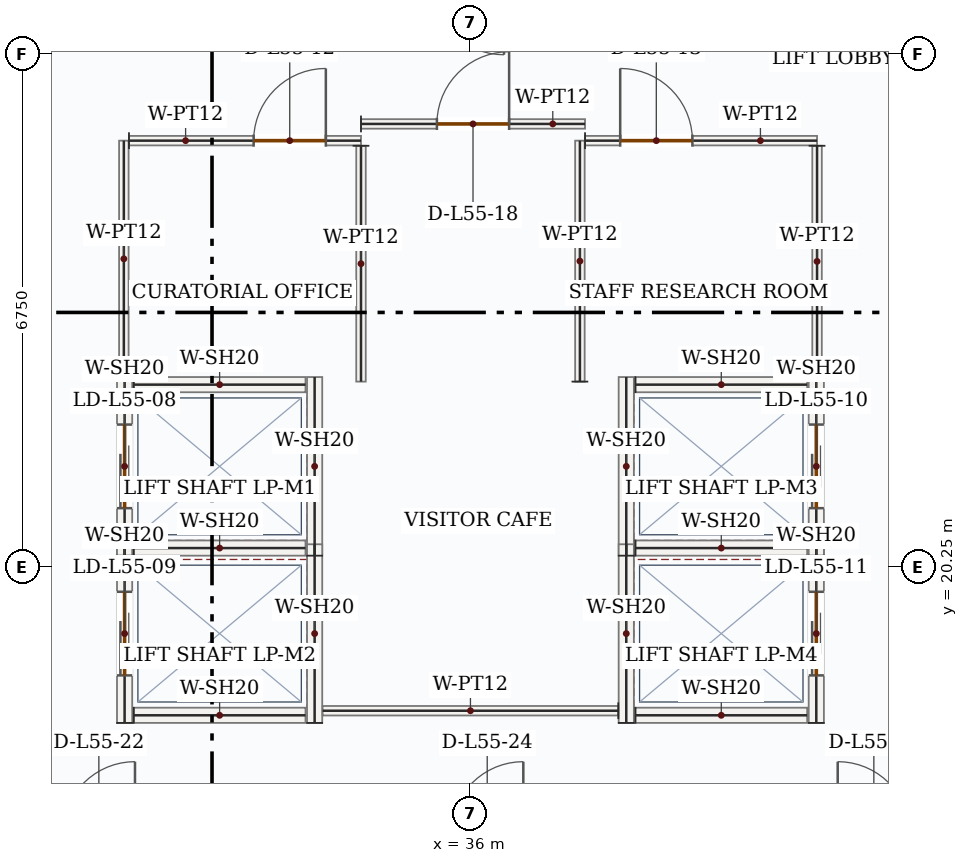
"""IFC4 building model, lengths in metres.
Left out: names, types, materials, properties, quantities, classifications, styles, units other than length and angle.
Written with IfcOpenShell. Run it as: python <this file> out.ifc"""

import sys

from ifc_helpers import new_model, si_unit, direction, frame, frame_2d, origin, place, context, subcontext, project, spatial, rectangle, extrude, source, transform, mapped, element, fill, save


model = new_model("IFC4")
c1 = context("Model", 3, precision=1e-05, world=origin(), true_north=direction((0.0, 1.0)))
c2 = subcontext(c1, "Body", "Model", "MODEL_VIEW")
j1 = project(units=[si_unit("LENGTHUNIT", "METRE"), si_unit("PLANEANGLEUNIT", "RADIAN")], contexts=[c1])
p1 = place(None, origin())
s1 = spatial("IfcSite", under=j1, at=p1, CompositionType="ELEMENT")
p2 = place(p1, origin())
s2 = spatial("IfcBuilding", under=s1, at=p2, CompositionType="ELEMENT")
p3 = place(p2, frame((0.0, 0.0, 234.3)))
s3 = spatial("IfcBuildingStorey", under=s2, at=p3, CompositionType="ELEMENT", Elevation=234.3)
p4 = place(p3, frame((31.45, 20.4, 0.0), z_axis=(0.0, 0.0, 1.0), x_axis=(0.0, 1.0, 0.0)))
e1 = element("IfcWall", 1, at=p4, inside=s3, PredefinedType="SOLIDWALL", context=c2, shape_type="SweptSolid", body=[
    extrude(rectangle(XDim=2.35, YDim=0.2, at=frame_2d((1.175, 0.0))), origin(), (0.0, 0.0, 1.0), 4.55),
])
p5 = place(p4, frame((0.625, 0.0, 0.0)))
e2 = element("IfcOpeningElement", 2, at=p5, cuts=e1, PredefinedType="OPENING", context=c2, shape_type="SweptSolid", body=[
    extrude(rectangle(XDim=1.1, YDim=2.15, at=frame_2d((0.55, 1.075))), frame((0.0, 0.11, 0.0), z_axis=(0.0, -1.0, 0.0), x_axis=(1.0, 0.0, 0.0)), (0.0, 0.0, 1.0), 0.22),
])
m1 = source(origin(), c2, "Body", "SweptSolid", [
    extrude(rectangle(XDim=2.35, YDim=0.2, at=frame_2d((1.175, 0.0))), origin(), (0.0, 0.0, 1.0), 4.55),
])
p6 = place(p3, frame((33.95, 20.4, 0.0), z_axis=(0.0, 0.0, 1.0), x_axis=(0.0, 1.0, 0.0)))
e3 = element("IfcWall", 3, at=p6, inside=s3, PredefinedType="SOLIDWALL", context=c2, shape_type="MappedRepresentation", body=[
    mapped(m1, transform((0.0, 0.0, 0.0), x_axis=(1.0, 0.0, 0.0), y_axis=(0.0, 1.0, 0.0), z_axis=(0.0, 0.0, 1.0), scale=1.0)),
])
m2 = source(origin(), c2, "Body", "SweptSolid", [
    extrude(rectangle(XDim=2.26, YDim=0.2, at=frame_2d((1.13, 0.0))), origin(), (0.0, 0.0, 1.0), 4.55),
])
for number, where, z_axis, x_axis in (
    (4, (31.57, 20.5, 0.0), (0.0, 0.0, 1.0), (1.0, 0.0, 0.0)),
    (5, (31.57, 22.65, 0.0), (0.0, 0.0, 1.0), (1.0, 0.0, 0.0)),
):
    element("IfcWall", number, at=place(p3, frame(where, z_axis=z_axis, x_axis=x_axis)), inside=s3, PredefinedType="SOLIDWALL", context=c2, shape_type="MappedRepresentation", body=[
        mapped(m2, transform((0.0, 0.0, 0.0), x_axis=(1.0, 0.0, 0.0), y_axis=(0.0, 1.0, 0.0), z_axis=(0.0, 0.0, 1.0), scale=1.0)),
    ])
p7 = place(p3, frame((31.45, 18.2, 0.0), z_axis=(0.0, 0.0, 1.0), x_axis=(0.0, 1.0, 0.0)))
e6 = element("IfcWall", 6, at=p7, inside=s3, PredefinedType="SOLIDWALL", context=c2, shape_type="SweptSolid", body=[
    extrude(rectangle(XDim=2.35, YDim=0.2, at=frame_2d((1.175, 0.0))), origin(), (0.0, 0.0, 1.0), 4.55),
])
p8 = place(p7, frame((0.625, 0.0, 0.0)))
e7 = element("IfcOpeningElement", 7, at=p8, cuts=e6, PredefinedType="OPENING", context=c2, shape_type="SweptSolid", body=[
    extrude(rectangle(XDim=1.1, YDim=2.15, at=frame_2d((0.55, 1.075))), frame((0.0, 0.11, 0.0), z_axis=(0.0, -1.0, 0.0), x_axis=(1.0, 0.0, 0.0)), (0.0, 0.0, 1.0), 0.22),
])
p9 = place(p3, frame((33.95, 18.2, 0.0), z_axis=(0.0, 0.0, 1.0), x_axis=(0.0, 1.0, 0.0)))
e8 = element("IfcWall", 8, at=p9, inside=s3, PredefinedType="SOLIDWALL", context=c2, shape_type="MappedRepresentation", body=[
    mapped(m1, transform((0.0, 0.0, 0.0), x_axis=(1.0, 0.0, 0.0), y_axis=(0.0, 1.0, 0.0), z_axis=(0.0, 0.0, 1.0), scale=1.0)),
])
p10 = place(p3, frame((31.57, 18.3, 0.0), z_axis=(0.0, 0.0, 1.0), x_axis=(1.0, 0.0, 0.0)))
e9 = element("IfcWall", 9, at=p10, inside=s3, PredefinedType="SOLIDWALL", context=c2, shape_type="MappedRepresentation", body=[
    mapped(m2, transform((0.0, 0.0, 0.0), x_axis=(1.0, 0.0, 0.0), y_axis=(0.0, 1.0, 0.0), z_axis=(0.0, 0.0, 1.0), scale=1.0)),
])
p11 = place(p3, frame((38.05, 20.4, 0.0), z_axis=(0.0, 0.0, 1.0), x_axis=(0.0, 1.0, 0.0)))
e10 = element("IfcWall", 10, at=p11, inside=s3, PredefinedType="SOLIDWALL", context=c2, shape_type="MappedRepresentation", body=[
    mapped(m1, transform((0.0, 0.0, 0.0), x_axis=(1.0, 0.0, 0.0), y_axis=(0.0, 1.0, 0.0), z_axis=(0.0, 0.0, 1.0), scale=1.0)),
])
p12 = place(p3, frame((40.55, 20.4, 0.0), z_axis=(0.0, 0.0, 1.0), x_axis=(0.0, 1.0, 0.0)))
e11 = element("IfcWall", 11, at=p12, inside=s3, PredefinedType="SOLIDWALL", context=c2, shape_type="SweptSolid", body=[
    extrude(rectangle(XDim=2.35, YDim=0.2, at=frame_2d((1.175, 0.0))), origin(), (0.0, 0.0, 1.0), 4.55),
])
p13 = place(p12, frame((0.625, 0.0, 0.0)))
e12 = element("IfcOpeningElement", 12, at=p13, cuts=e11, PredefinedType="OPENING", context=c2, shape_type="SweptSolid", body=[
    extrude(rectangle(XDim=1.1, YDim=2.15, at=frame_2d((0.55, 1.075))), frame((0.0, 0.11, 0.0), z_axis=(0.0, -1.0, 0.0), x_axis=(1.0, 0.0, 0.0)), (0.0, 0.0, 1.0), 0.22),
])
for number, where, z_axis, x_axis in (
    (13, (38.17, 20.5, 0.0), (0.0, 0.0, 1.0), (1.0, 0.0, 0.0)),
    (14, (38.17, 22.65, 0.0), (0.0, 0.0, 1.0), (1.0, 0.0, 0.0)),
):
    element("IfcWall", number, at=place(p3, frame(where, z_axis=z_axis, x_axis=x_axis)), inside=s3, PredefinedType="SOLIDWALL", context=c2, shape_type="MappedRepresentation", body=[
        mapped(m2, transform((0.0, 0.0, 0.0), x_axis=(1.0, 0.0, 0.0), y_axis=(0.0, 1.0, 0.0), z_axis=(0.0, 0.0, 1.0), scale=1.0)),
    ])
p14 = place(p3, frame((38.05, 18.2, 0.0), z_axis=(0.0, 0.0, 1.0), x_axis=(0.0, 1.0, 0.0)))
e15 = element("IfcWall", 15, at=p14, inside=s3, PredefinedType="SOLIDWALL", context=c2, shape_type="MappedRepresentation", body=[
    mapped(m1, transform((0.0, 0.0, 0.0), x_axis=(1.0, 0.0, 0.0), y_axis=(0.0, 1.0, 0.0), z_axis=(0.0, 0.0, 1.0), scale=1.0)),
])
p15 = place(p3, frame((40.55, 18.2, 0.0), z_axis=(0.0, 0.0, 1.0), x_axis=(0.0, 1.0, 0.0)))
e16 = element("IfcWall", 16, at=p15, inside=s3, PredefinedType="SOLIDWALL", context=c2, shape_type="SweptSolid", body=[
    extrude(rectangle(XDim=2.35, YDim=0.2, at=frame_2d((1.175, 0.0))), origin(), (0.0, 0.0, 1.0), 4.55),
])
p16 = place(p15, frame((0.625, 0.0, 0.0)))
e17 = element("IfcOpeningElement", 17, at=p16, cuts=e16, PredefinedType="OPENING", context=c2, shape_type="SweptSolid", body=[
    extrude(rectangle(XDim=1.1, YDim=2.15, at=frame_2d((0.55, 1.075))), frame((0.0, 0.11, 0.0), z_axis=(0.0, -1.0, 0.0), x_axis=(1.0, 0.0, 0.0)), (0.0, 0.0, 1.0), 0.22),
])
p17 = place(p3, frame((38.17, 18.3, 0.0), z_axis=(0.0, 0.0, 1.0), x_axis=(1.0, 0.0, 0.0)))
e18 = element("IfcWall", 18, at=p17, inside=s3, PredefinedType="SOLIDWALL", context=c2, shape_type="MappedRepresentation", body=[
    mapped(m2, transform((0.0, 0.0, 0.0), x_axis=(1.0, 0.0, 0.0), y_axis=(0.0, 1.0, 0.0), z_axis=(0.0, 0.0, 1.0), scale=1.0)),
])
m3 = source(origin(), c2, "Body", "SweptSolid", [
    extrude(rectangle(XDim=3.11, YDim=0.125, at=frame_2d((1.555, 0.0))), origin(), (0.0, 0.0, 1.0), 4.55),
])
p18 = place(p3, frame((31.44, 22.75, 0.0), z_axis=(0.0, 0.0, 1.0), x_axis=(0.0, 1.0, 0.0)))
e19 = element("IfcWall", 19, at=p18, inside=s3, PredefinedType="PARTITIONING", context=c2, shape_type="MappedRepresentation", body=[
    mapped(m3, transform((0.0, 0.0, 0.0), x_axis=(1.0, 0.0, 0.0), y_axis=(0.0, 1.0, 0.0), z_axis=(0.0, 0.0, 1.0), scale=1.0)),
])
p19 = place(p3, frame((31.508, 25.86, 0.0), z_axis=(0.0, 0.0, 1.0), x_axis=(1.0, 0.0, 0.0)))
e20 = element("IfcWall", 20, at=p19, inside=s3, PredefinedType="PARTITIONING", context=c2, shape_type="SweptSolid", body=[
    extrude(rectangle(XDim=3.052, YDim=0.125, at=frame_2d((1.526, 0.0))), origin(), (0.0, 0.0, 1.0), 4.55),
])
p20 = place(p19, frame((1.64, 0.0, 0.0)))
e21 = element("IfcOpeningElement", 21, at=p20, cuts=e20, PredefinedType="OPENING", context=c2, shape_type="SweptSolid", body=[
    extrude(rectangle(XDim=0.95, YDim=2.15, at=frame_2d((0.475, 1.075))), frame((0.0, 0.073, 0.0), z_axis=(0.0, -1.0, 0.0), x_axis=(1.0, 0.0, 0.0)), (0.0, 0.0, 1.0), 0.145),
])
m4 = source(origin(), c2, "Body", "SweptSolid", [
    extrude(rectangle(XDim=3.103, YDim=0.125, at=frame_2d((1.551, 0.0))), origin(), (0.0, 0.0, 1.0), 4.55),
])
p21 = place(p3, frame((34.56, 25.792, 0.0), z_axis=(0.0, 0.0, 1.0), x_axis=(0.0, -1.0, 0.0)))
e22 = element("IfcWall", 22, at=p21, inside=s3, PredefinedType="PARTITIONING", context=c2, shape_type="MappedRepresentation", body=[
    mapped(m4, transform((0.0, 0.0, 0.0), x_axis=(1.0, 0.0, 0.0), y_axis=(0.0, 1.0, 0.0), z_axis=(0.0, 0.0, 1.0), scale=1.0)),
])
m5 = source(origin(), c2, "Body", "SweptSolid", [
    extrude(rectangle(XDim=3.17, YDim=0.125, at=frame_2d((1.585, 0.0))), origin(), (0.0, 0.0, 1.0), 4.55),
])
p22 = place(p3, frame((37.44, 22.69, 0.0), z_axis=(0.0, 0.0, 1.0), x_axis=(0.0, 1.0, 0.0)))
e23 = element("IfcWall", 23, at=p22, inside=s3, PredefinedType="PARTITIONING", context=c2, shape_type="MappedRepresentation", body=[
    mapped(m5, transform((0.0, 0.0, 0.0), x_axis=(1.0, 0.0, 0.0), y_axis=(0.0, 1.0, 0.0), z_axis=(0.0, 0.0, 1.0), scale=1.0)),
])
p23 = place(p3, frame((37.508, 25.86, 0.0), z_axis=(0.0, 0.0, 1.0), x_axis=(1.0, 0.0, 0.0)))
e24 = element("IfcWall", 24, at=p23, inside=s3, PredefinedType="PARTITIONING", context=c2, shape_type="SweptSolid", body=[
    extrude(rectangle(XDim=3.052, YDim=0.125, at=frame_2d((1.526, 0.0))), origin(), (0.0, 0.0, 1.0), 4.55),
])
p24 = place(p23, frame((0.463, 0.0, 0.0)))
e25 = element("IfcOpeningElement", 25, at=p24, cuts=e24, PredefinedType="OPENING", context=c2, shape_type="SweptSolid", body=[
    extrude(rectangle(XDim=0.95, YDim=2.15, at=frame_2d((0.475, 1.075))), frame((0.0, 0.073, 0.0), z_axis=(0.0, -1.0, 0.0), x_axis=(1.0, 0.0, 0.0)), (0.0, 0.0, 1.0), 0.145),
])
m6 = source(origin(), c2, "Body", "SweptSolid", [
    extrude(rectangle(XDim=3.042, YDim=0.125, at=frame_2d((1.521, 0.0))), origin(), (0.0, 0.0, 1.0), 4.55),
])
p25 = place(p3, frame((40.56, 25.792, 0.0), z_axis=(0.0, 0.0, 1.0), x_axis=(0.0, -1.0, 0.0)))
e26 = element("IfcWall", 26, at=p25, inside=s3, PredefinedType="PARTITIONING", context=c2, shape_type="MappedRepresentation", body=[
    mapped(m6, transform((0.0, 0.0, 0.0), x_axis=(1.0, 0.0, 0.0), y_axis=(0.0, 1.0, 0.0), z_axis=(0.0, 0.0, 1.0), scale=1.0)),
])
m7 = source(origin(), c2, "Body", "SweptSolid", [
    extrude(rectangle(XDim=3.89, YDim=0.125, at=frame_2d((1.945, 0.0))), origin(), (0.0, 0.0, 1.0), 4.55),
])
p26 = place(p3, frame((37.945, 18.36, 0.0), z_axis=(0.0, 0.0, 1.0), x_axis=(-1.0, 0.0, 0.0)))
e27 = element("IfcWall", 27, at=p26, inside=s3, PredefinedType="PARTITIONING", context=c2, shape_type="MappedRepresentation", body=[
    mapped(m7, transform((0.0, 0.0, 0.0), x_axis=(1.0, 0.0, 0.0), y_axis=(0.0, 1.0, 0.0), z_axis=(0.0, 0.0, 1.0), scale=1.0)),
])
p27 = place(p3, frame((34.56, 26.08, 0.0), z_axis=(0.0, 0.0, 1.0), x_axis=(1.0, 0.0, 0.0)))
e28 = element("IfcWall", 28, at=p27, inside=s3, PredefinedType="PARTITIONING", context=c2, shape_type="SweptSolid", body=[
    extrude(rectangle(XDim=2.948, YDim=0.125, at=frame_2d((1.474, 0.0))), origin(), (0.0, 0.0, 1.0), 4.55),
])
p28 = place(p27, frame((0.999, 0.0, 0.0)))
e29 = element("IfcOpeningElement", 29, at=p28, cuts=e28, PredefinedType="OPENING", context=c2, shape_type="SweptSolid", body=[
    extrude(rectangle(XDim=0.95, YDim=2.15, at=frame_2d((0.475, 1.075))), frame((0.0, 0.073, 0.0), z_axis=(0.0, -1.0, 0.0), x_axis=(1.0, 0.0, 0.0)), (0.0, 0.0, 1.0), 0.145),
])
m8 = source(origin(), c2, "Body", "SweptSolid", [
    extrude(rectangle(XDim=1.1, YDim=2.15, at=frame_2d((0.55, 1.075))), frame((0.0, 0.025, 0.0), z_axis=(0.0, -1.0, 0.0), x_axis=(1.0, 0.0, 0.0)), (0.0, 0.0, 1.0), 0.05),
])
p29 = place(p5, origin())
e30 = element("IfcDoor", 30, at=p29, inside=s3, OperationType="DOUBLE_DOOR_SLIDING", PredefinedType="DOOR", context=c2, shape_type="MappedRepresentation", body=[
    mapped(m8, transform((0.0, 0.0, 0.0), x_axis=(1.0, 0.0, 0.0), y_axis=(0.0, 1.0, 0.0), z_axis=(0.0, 0.0, 1.0), scale=1.0)),
])
fill(e2, e30)
p30 = place(p8, origin())
e31 = element("IfcDoor", 31, at=p30, inside=s3, OperationType="DOUBLE_DOOR_SLIDING", PredefinedType="DOOR", context=c2, shape_type="MappedRepresentation", body=[
    mapped(m8, transform((0.0, 0.0, 0.0), x_axis=(1.0, 0.0, 0.0), y_axis=(0.0, 1.0, 0.0), z_axis=(0.0, 0.0, 1.0), scale=1.0)),
])
fill(e7, e31)
p31 = place(p13, origin())
e32 = element("IfcDoor", 32, at=p31, inside=s3, OperationType="DOUBLE_DOOR_SLIDING", PredefinedType="DOOR", context=c2, shape_type="MappedRepresentation", body=[
    mapped(m8, transform((0.0, 0.0, 0.0), x_axis=(1.0, 0.0, 0.0), y_axis=(0.0, 1.0, 0.0), z_axis=(0.0, 0.0, 1.0), scale=1.0)),
])
fill(e12, e32)
p32 = place(p16, origin())
e33 = element("IfcDoor", 33, at=p32, inside=s3, OperationType="DOUBLE_DOOR_SLIDING", PredefinedType="DOOR", context=c2, shape_type="MappedRepresentation", body=[
    mapped(m8, transform((0.0, 0.0, 0.0), x_axis=(1.0, 0.0, 0.0), y_axis=(0.0, 1.0, 0.0), z_axis=(0.0, 0.0, 1.0), scale=1.0)),
])
fill(e17, e33)
m9 = source(origin(), c2, "Body", "SweptSolid", [
    extrude(rectangle(XDim=0.95, YDim=2.15, at=frame_2d((0.475, 1.075))), frame((0.0, 0.025, 0.0), z_axis=(0.0, -1.0, 0.0), x_axis=(1.0, 0.0, 0.0)), (0.0, 0.0, 1.0), 0.05),
])
p33 = place(p20, origin())
e34 = element("IfcDoor", 34, at=p33, inside=s3, OperationType="SINGLE_SWING_RIGHT", PredefinedType="DOOR", context=c2, shape_type="MappedRepresentation", body=[
    mapped(m9, transform((0.0, 0.0, 0.0), x_axis=(1.0, 0.0, 0.0), y_axis=(0.0, 1.0, 0.0), z_axis=(0.0, 0.0, 1.0), scale=1.0)),
])
fill(e21, e34)
p34 = place(p24, origin())
e35 = element("IfcDoor", 35, at=p34, inside=s3, OperationType="SINGLE_SWING_LEFT", PredefinedType="DOOR", context=c2, shape_type="MappedRepresentation", body=[
    mapped(m9, transform((0.0, 0.0, 0.0), x_axis=(1.0, 0.0, 0.0), y_axis=(0.0, 1.0, 0.0), z_axis=(0.0, 0.0, 1.0), scale=1.0)),
])
fill(e25, e35)
p35 = place(p28, origin())
e36 = element("IfcDoor", 36, at=p35, inside=s3, OperationType="SINGLE_SWING_RIGHT", PredefinedType="DOOR", context=c2, shape_type="MappedRepresentation", body=[
    mapped(m9, transform((0.0, 0.0, 0.0), x_axis=(1.0, 0.0, 0.0), y_axis=(0.0, 1.0, 0.0), z_axis=(0.0, 0.0, 1.0), scale=1.0)),
])
fill(e29, e36)
save(model, sys.argv[1])
